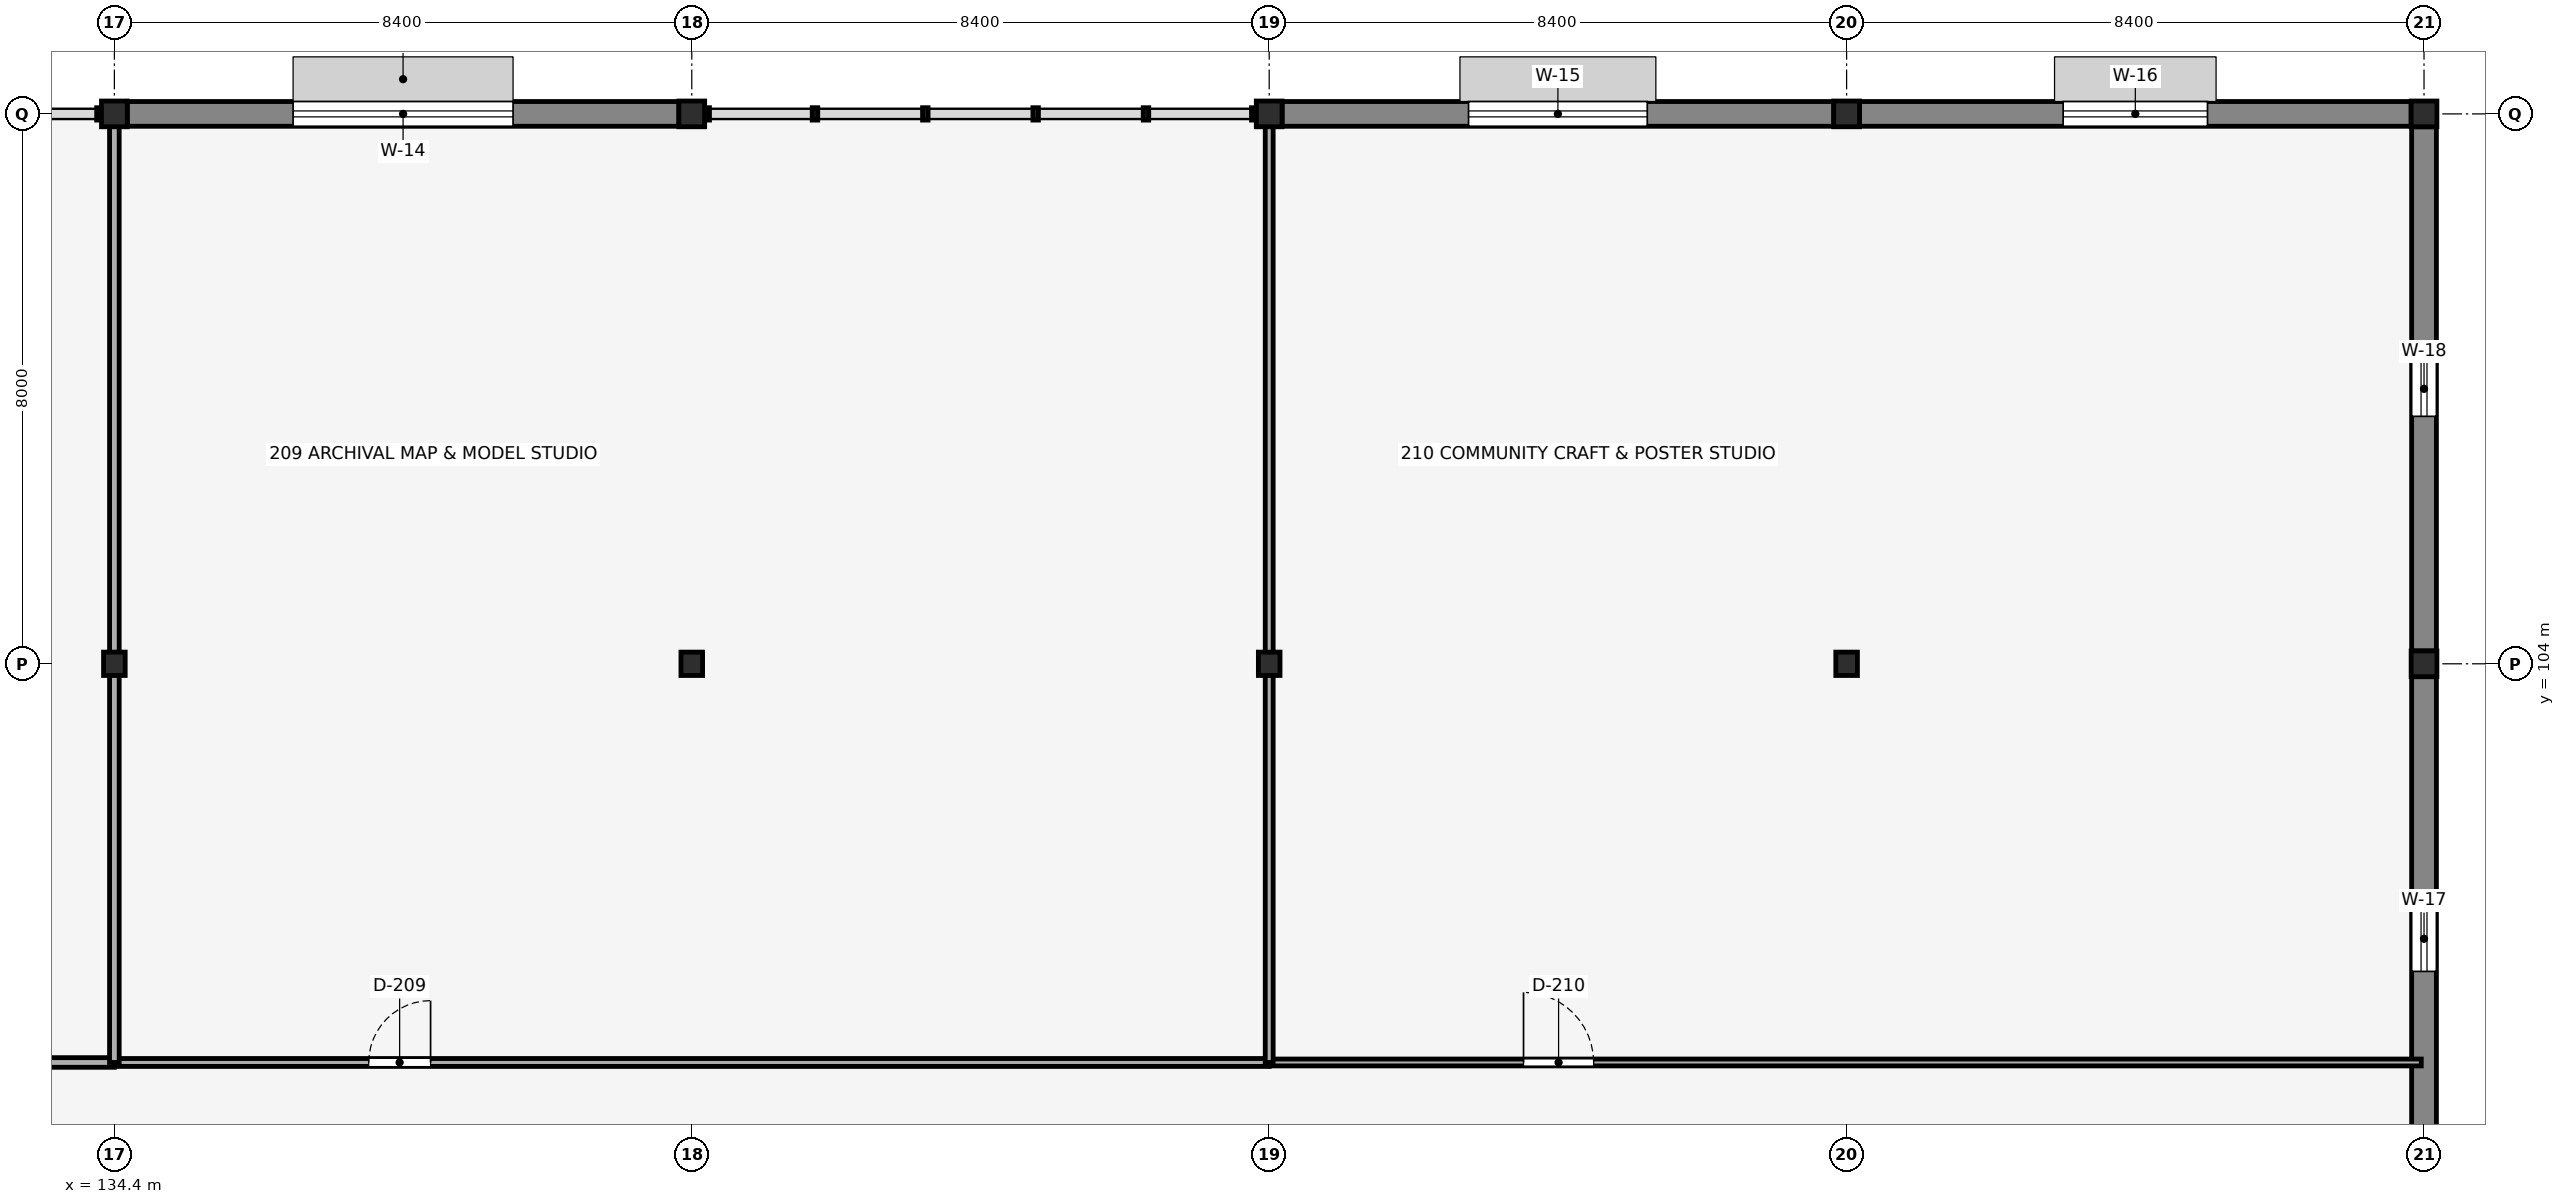
"""IFC4 building model, lengths in metres.
Left out: names, types, materials, properties, quantities, classifications, styles, units other than length and angle.
Written with IfcOpenShell. Run it as: python <this file> out.ifc"""

import sys

from ifc_helpers import new_model, si_unit, direction, frame, frame_2d, origin, origin_2d, place, context, subcontext, project, spatial, rectangle, i_section, extrude, element, fill, save


model = new_model("IFC4")
c1 = context("Model", 3, precision=1e-05, world=origin(), true_north=direction((0.0, 1.0)))
c2 = subcontext(c1, "Body", "Model", "MODEL_VIEW")
j1 = project(units=[si_unit("LENGTHUNIT", "METRE"), si_unit("PLANEANGLEUNIT", "RADIAN")], contexts=[c1])
p1 = place(None, origin())
s1 = spatial("IfcSite", under=j1, at=p1, CompositionType="ELEMENT")
p2 = place(p1, origin())
s2 = spatial("IfcBuilding", under=s1, at=p2, CompositionType="ELEMENT")
p3 = place(p2, frame((0.0, 0.0, 9.52)))
s3 = spatial("IfcBuildingStorey", under=s2, at=p3, CompositionType="ELEMENT", Elevation=9.52)
p4 = place(p3, frame((134.4, 104.0, 0.0), z_axis=(0.0, 0.0, 1.0), x_axis=(1.0, 0.0, 0.0)))
e1 = element("IfcColumn", 1, at=p4, inside=s3, PredefinedType="COLUMN", context=c2, shape_type="SweptSolid", body=[
    extrude(i_section(OverallWidth=0.314, OverallDepth=0.34, WebThickness=0.019, FlangeThickness=0.031, FilletRadius=0.015, at=origin_2d()), origin(), (0.0, 0.0, 1.0), 3.57),
])
p5 = place(p3, frame((134.4, 112.0, 0.0), z_axis=(0.0, 0.0, 1.0), x_axis=(1.0, 0.0, 0.0)))
e2 = element("IfcColumn", 2, at=p5, inside=s3, PredefinedType="COLUMN", context=c2, shape_type="SweptSolid", body=[
    extrude(i_section(OverallWidth=0.375, OverallDepth=0.375, WebThickness=0.017, FlangeThickness=0.027, FilletRadius=0.015, at=origin_2d()), origin(), (0.0, 0.0, 1.0), 3.57),
])
p6 = place(p3, frame((142.8, 104.0, 0.0), z_axis=(0.0, 0.0, 1.0), x_axis=(1.0, 0.0, 0.0)))
e3 = element("IfcColumn", 3, at=p6, inside=s3, PredefinedType="COLUMN", context=c2, shape_type="SweptSolid", body=[
    extrude(i_section(OverallWidth=0.314, OverallDepth=0.34, WebThickness=0.019, FlangeThickness=0.031, FilletRadius=0.015, at=origin_2d()), origin(), (0.0, 0.0, 1.0), 3.57),
])
p7 = place(p3, frame((142.8, 112.0, 0.0), z_axis=(0.0, 0.0, 1.0), x_axis=(1.0, 0.0, 0.0)))
e4 = element("IfcColumn", 4, at=p7, inside=s3, PredefinedType="COLUMN", context=c2, shape_type="SweptSolid", body=[
    extrude(i_section(OverallWidth=0.375, OverallDepth=0.375, WebThickness=0.017, FlangeThickness=0.027, FilletRadius=0.015, at=origin_2d()), origin(), (0.0, 0.0, 1.0), 3.57),
])
p8 = place(p3, frame((151.2, 104.0, 0.0), z_axis=(0.0, 0.0, 1.0), x_axis=(1.0, 0.0, 0.0)))
e5 = element("IfcColumn", 5, at=p8, inside=s3, PredefinedType="COLUMN", context=c2, shape_type="SweptSolid", body=[
    extrude(i_section(OverallWidth=0.314, OverallDepth=0.34, WebThickness=0.019, FlangeThickness=0.031, FilletRadius=0.015, at=origin_2d()), origin(), (0.0, 0.0, 1.0), 3.57),
])
p9 = place(p3, frame((151.2, 112.0, 0.0), z_axis=(0.0, 0.0, 1.0), x_axis=(1.0, 0.0, 0.0)))
e6 = element("IfcColumn", 6, at=p9, inside=s3, PredefinedType="COLUMN", context=c2, shape_type="SweptSolid", body=[
    extrude(i_section(OverallWidth=0.375, OverallDepth=0.375, WebThickness=0.017, FlangeThickness=0.027, FilletRadius=0.015, at=origin_2d()), origin(), (0.0, 0.0, 1.0), 3.57),
])
p10 = place(p3, frame((159.6, 104.0, 0.0), z_axis=(0.0, 0.0, 1.0), x_axis=(1.0, 0.0, 0.0)))
e7 = element("IfcColumn", 7, at=p10, inside=s3, PredefinedType="COLUMN", context=c2, shape_type="SweptSolid", body=[
    extrude(i_section(OverallWidth=0.314, OverallDepth=0.34, WebThickness=0.019, FlangeThickness=0.031, FilletRadius=0.015, at=origin_2d()), origin(), (0.0, 0.0, 1.0), 3.57),
])
for number, where, z_axis, x_axis in (
    (8, (159.6, 112.0, 0.0), (0.0, 0.0, 1.0), (1.0, 0.0, 0.0)),
    (9, (168.0, 104.0, 0.0), (0.0, 0.0, 1.0), (1.0, 0.0, 0.0)),
    (10, (168.0, 112.0, 0.0), (0.0, 0.0, 1.0), (1.0, 0.0, 0.0)),
):
    element("IfcColumn", number, at=place(p3, frame(where, z_axis=z_axis, x_axis=x_axis)), inside=s3, PredefinedType="COLUMN", context=c2, shape_type="SweptSolid", body=[
        extrude(i_section(OverallWidth=0.375, OverallDepth=0.375, WebThickness=0.017, FlangeThickness=0.027, FilletRadius=0.015, at=origin_2d()), origin(), (0.0, 0.0, 1.0), 3.57),
    ])
p11 = place(p3, frame((134.587, 112.0, 0.0), z_axis=(0.0, 0.0, 1.0), x_axis=(1.0, 0.0, 0.0)))
e11 = element("IfcWall", 11, at=p11, inside=s3, PredefinedType="SOLIDWALL", context=c2, shape_type="SweptSolid", body=[
    extrude(rectangle(XDim=8.025, YDim=0.36, at=frame_2d((4.013, 0.0))), origin(), (0.0, 0.0, 1.0), 3.27),
])
p12 = place(p11, frame((2.413, 0.0, 1.55), z_axis=(0.0, 0.0, 1.0), x_axis=(1.0, 0.0, 0.0)))
e12 = element("IfcOpeningElement", 12, at=p12, cuts=e11, PredefinedType="OPENING", context=c2, shape_type="SweptSolid", body=[
    extrude(rectangle(XDim=3.2, YDim=0.9, at=frame_2d((1.6, 0.45))), frame((0.0, 0.19, 0.0), z_axis=(0.0, -1.0, 0.0), x_axis=(1.0, 0.0, 0.0)), (0.0, 0.0, 1.0), 0.38),
])
p13 = place(p3, frame((151.387, 112.0, 0.0), z_axis=(0.0, 0.0, 1.0), x_axis=(1.0, 0.0, 0.0)))
e13 = element("IfcWall", 13, at=p13, inside=s3, PredefinedType="SOLIDWALL", context=c2, shape_type="SweptSolid", body=[
    extrude(rectangle(XDim=8.025, YDim=0.36, at=frame_2d((4.013, 0.0))), origin(), (0.0, 0.0, 1.0), 3.27),
])
p14 = place(p13, frame((2.713, 0.0, 1.55), z_axis=(0.0, 0.0, 1.0), x_axis=(1.0, 0.0, 0.0)))
e14 = element("IfcOpeningElement", 14, at=p14, cuts=e13, PredefinedType="OPENING", context=c2, shape_type="SweptSolid", body=[
    extrude(rectangle(XDim=2.6, YDim=0.85, at=frame_2d((1.3, 0.425))), frame((0.0, 0.19, 0.0), z_axis=(0.0, -1.0, 0.0), x_axis=(1.0, 0.0, 0.0)), (0.0, 0.0, 1.0), 0.38),
])
p15 = place(p3, frame((159.787, 112.0, 0.0), z_axis=(0.0, 0.0, 1.0), x_axis=(1.0, 0.0, 0.0)))
e15 = element("IfcWall", 15, at=p15, inside=s3, PredefinedType="SOLIDWALL", context=c2, shape_type="SweptSolid", body=[
    extrude(rectangle(XDim=8.025, YDim=0.36, at=frame_2d((4.013, 0.0))), origin(), (0.0, 0.0, 1.0), 3.27),
])
p16 = place(p15, frame((2.963, 0.0, 1.55), z_axis=(0.0, 0.0, 1.0), x_axis=(1.0, 0.0, 0.0)))
e16 = element("IfcOpeningElement", 16, at=p16, cuts=e15, PredefinedType="OPENING", context=c2, shape_type="SweptSolid", body=[
    extrude(rectangle(XDim=2.1, YDim=0.8, at=frame_2d((1.05, 0.4))), frame((0.0, 0.19, 0.0), z_axis=(0.0, -1.0, 0.0), x_axis=(1.0, 0.0, 0.0)), (0.0, 0.0, 1.0), 0.38),
])
p17 = place(p3, frame((168.0, 96.187, 0.0), z_axis=(0.0, 0.0, 1.0), x_axis=(0.0, 1.0, 0.0)))
e17 = element("IfcWall", 17, at=p17, inside=s3, PredefinedType="SOLIDWALL", context=c2, shape_type="SweptSolid", body=[
    extrude(rectangle(XDim=7.625, YDim=0.36, at=frame_2d((3.813, 0.0))), origin(), (0.0, 0.0, 1.0), 3.219),
])
p18 = place(p17, frame((3.338, 0.0, 0.65), z_axis=(0.0, 0.0, 1.0), x_axis=(1.0, 0.0, 0.0)))
e18 = element("IfcOpeningElement", 18, at=p18, cuts=e17, PredefinedType="OPENING", context=c2, shape_type="SweptSolid", body=[
    extrude(rectangle(XDim=0.95, YDim=2.1, at=frame_2d((0.475, 1.05))), frame((0.0, 0.19, 0.0), z_axis=(0.0, -1.0, 0.0), x_axis=(1.0, 0.0, 0.0)), (0.0, 0.0, 1.0), 0.38),
])
p19 = place(p3, frame((168.0, 104.187, 0.0), z_axis=(0.0, 0.0, 1.0), x_axis=(0.0, 1.0, 0.0)))
e19 = element("IfcWall", 19, at=p19, inside=s3, PredefinedType="SOLIDWALL", context=c2, shape_type="SweptSolid", body=[
    extrude(rectangle(XDim=7.625, YDim=0.36, at=frame_2d((3.813, 0.0))), origin(), (0.0, 0.0, 1.0), 3.219),
])
p20 = place(p19, frame((3.413, 0.0, 0.65), z_axis=(0.0, 0.0, 1.0), x_axis=(1.0, 0.0, 0.0)))
e20 = element("IfcOpeningElement", 20, at=p20, cuts=e19, PredefinedType="OPENING", context=c2, shape_type="SweptSolid", body=[
    extrude(rectangle(XDim=0.8, YDim=1.85, at=frame_2d((0.4, 0.925))), frame((0.0, 0.19, 0.0), z_axis=(0.0, -1.0, 0.0), x_axis=(1.0, 0.0, 0.0)), (0.0, 0.0, 1.0), 0.38),
])
p21 = place(p3, frame((100.84, 98.2, 0.0), z_axis=(0.0, 0.0, 1.0), x_axis=(1.0, 0.0, 0.0)))
e21 = element("IfcWall", 21, at=p21, inside=s3, PredefinedType="PARTITIONING", context=c2, shape_type="SweptSolid", body=[
    extrude(rectangle(XDim=33.56, YDim=0.14, at=frame_2d((16.78, 0.0))), origin(), (0.0, 0.0, 1.0), 3.57),
])
p22 = place(p21, frame((3.66, 0.0, 0.0), z_axis=(0.0, 0.0, 1.0), x_axis=(1.0, 0.0, 0.0)))
e22 = element("IfcOpeningElement", 22, at=p22, cuts=e21, PredefinedType="OPENING", context=c2, shape_type="SweptSolid", body=[
    extrude(rectangle(XDim=1.1, YDim=2.2, at=frame_2d((0.55, 1.1))), frame((0.0, 0.08, 0.0), z_axis=(0.0, -1.0, 0.0), x_axis=(1.0, 0.0, 0.0)), (0.0, 0.0, 1.0), 0.16),
])
p23 = place(p3, frame((134.4, 98.2, 0.0), z_axis=(0.0, 0.0, 1.0), x_axis=(1.0, 0.0, 0.0)))
e23 = element("IfcWall", 23, at=p23, inside=s3, PredefinedType="PARTITIONING", context=c2, shape_type="SweptSolid", body=[
    extrude(rectangle(XDim=16.8, YDim=0.115, at=frame_2d((8.4, 0.0))), origin(), (0.0, 0.0, 1.0), 3.107),
])
p24 = place(p23, frame((3.7, 0.0, 0.0), z_axis=(0.0, 0.0, 1.0), x_axis=(1.0, 0.0, 0.0)))
e24 = element("IfcOpeningElement", 24, at=p24, cuts=e23, PredefinedType="OPENING", context=c2, shape_type="SweptSolid", body=[
    extrude(rectangle(XDim=0.9, YDim=2.1, at=frame_2d((0.45, 1.05))), frame((0.0, 0.067, 0.0), z_axis=(0.0, -1.0, 0.0), x_axis=(1.0, 0.0, 0.0)), (0.0, 0.0, 1.0), 0.135),
])
p25 = place(p3, frame((151.2, 98.2, 0.0), z_axis=(0.0, 0.0, 1.0), x_axis=(1.0, 0.0, 0.0)))
e25 = element("IfcWall", 25, at=p25, inside=s3, PredefinedType="PARTITIONING", context=c2, shape_type="SweptSolid", body=[
    extrude(rectangle(XDim=16.76, YDim=0.1, at=frame_2d((8.38, 0.0))), origin(), (0.0, 0.0, 1.0), 3.107),
])
p26 = place(p25, frame((3.7, 0.0, 0.0), z_axis=(0.0, 0.0, 1.0), x_axis=(1.0, 0.0, 0.0)))
e26 = element("IfcOpeningElement", 26, at=p26, cuts=e25, PredefinedType="OPENING", context=c2, shape_type="SweptSolid", body=[
    extrude(rectangle(XDim=1.02, YDim=2.16, at=frame_2d((0.51, 1.08))), frame((0.0, 0.06, 0.0), z_axis=(0.0, -1.0, 0.0), x_axis=(1.0, 0.0, 0.0)), (0.0, 0.0, 1.0), 0.12),
])
p27 = place(p3, frame((134.4, 98.2, 0.0), z_axis=(0.0, 0.0, 1.0), x_axis=(0.0, 1.0, 0.0)))
e27 = element("IfcWall", 27, at=p27, inside=s3, PredefinedType="PARTITIONING", context=c2, shape_type="SweptSolid", body=[
    extrude(rectangle(XDim=5.64, YDim=0.14, at=frame_2d((2.82, 0.0))), origin(), (0.0, 0.0, 1.0), 3.107),
])
p28 = place(p3, frame((134.4, 104.16, 0.0), z_axis=(0.0, 0.0, 1.0), x_axis=(0.0, 1.0, 0.0)))
e28 = element("IfcWall", 28, at=p28, inside=s3, PredefinedType="PARTITIONING", context=c2, shape_type="SweptSolid", body=[
    extrude(rectangle(XDim=7.663, YDim=0.14, at=frame_2d((3.832, 0.0))), origin(), (0.0, 0.0, 1.0), 3.107),
])
p29 = place(p3, frame((151.2, 98.2, 0.0), z_axis=(0.0, 0.0, 1.0), x_axis=(0.0, 1.0, 0.0)))
e29 = element("IfcWall", 29, at=p29, inside=s3, PredefinedType="PARTITIONING", context=c2, shape_type="SweptSolid", body=[
    extrude(rectangle(XDim=5.64, YDim=0.115, at=frame_2d((2.82, 0.0))), origin(), (0.0, 0.0, 1.0), 3.107),
])
p30 = place(p3, frame((151.2, 104.16, 0.0), z_axis=(0.0, 0.0, 1.0), x_axis=(0.0, 1.0, 0.0)))
e30 = element("IfcWall", 30, at=p30, inside=s3, PredefinedType="PARTITIONING", context=c2, shape_type="SweptSolid", body=[
    extrude(rectangle(XDim=7.663, YDim=0.115, at=frame_2d((3.832, 0.0))), origin(), (0.0, 0.0, 1.0), 3.107),
])
p31 = place(p12, origin())
e31 = element("IfcWindow", 31, at=p31, inside=s3, PartitioningType="TRIPLE_PANEL_HORIZONTAL", PredefinedType="WINDOW", context=c2, shape_type="SweptSolid", body=[
    extrude(rectangle(XDim=3.2, YDim=0.9, at=frame_2d((1.6, 0.45))), frame((0.0, 0.03, 0.0), z_axis=(0.0, -1.0, 0.0), x_axis=(1.0, 0.0, 0.0)), (0.0, 0.0, 1.0), 0.06),
])
fill(e12, e31)
p32 = place(p14, origin())
e32 = element("IfcWindow", 32, at=p32, inside=s3, PartitioningType="DOUBLE_PANEL_HORIZONTAL", PredefinedType="WINDOW", context=c2, shape_type="SweptSolid", body=[
    extrude(rectangle(XDim=2.6, YDim=0.85, at=frame_2d((1.3, 0.425))), frame((0.0, 0.03, 0.0), z_axis=(0.0, -1.0, 0.0), x_axis=(1.0, 0.0, 0.0)), (0.0, 0.0, 1.0), 0.06),
])
fill(e14, e32)
p33 = place(p16, origin())
e33 = element("IfcWindow", 33, at=p33, inside=s3, PartitioningType="DOUBLE_PANEL_HORIZONTAL", PredefinedType="WINDOW", context=c2, shape_type="SweptSolid", body=[
    extrude(rectangle(XDim=2.1, YDim=0.8, at=frame_2d((1.05, 0.4))), frame((0.0, 0.03, 0.0), z_axis=(0.0, -1.0, 0.0), x_axis=(1.0, 0.0, 0.0)), (0.0, 0.0, 1.0), 0.06),
])
fill(e16, e33)
p34 = place(p18, origin())
e34 = element("IfcWindow", 34, at=p34, inside=s3, PartitioningType="SINGLE_PANEL", PredefinedType="WINDOW", context=c2, shape_type="SweptSolid", body=[
    extrude(rectangle(XDim=0.95, YDim=2.1, at=frame_2d((0.475, 1.05))), frame((0.0, 0.03, 0.0), z_axis=(0.0, -1.0, 0.0), x_axis=(1.0, 0.0, 0.0)), (0.0, 0.0, 1.0), 0.06),
])
fill(e18, e34)
p35 = place(p20, origin())
e35 = element("IfcWindow", 35, at=p35, inside=s3, PartitioningType="SINGLE_PANEL", PredefinedType="WINDOW", context=c2, shape_type="SweptSolid", body=[
    extrude(rectangle(XDim=0.8, YDim=1.85, at=frame_2d((0.4, 0.925))), frame((0.0, 0.03, 0.0), z_axis=(0.0, -1.0, 0.0), x_axis=(1.0, 0.0, 0.0)), (0.0, 0.0, 1.0), 0.06),
])
fill(e20, e35)
p36 = place(p24, origin())
e36 = element("IfcDoor", 36, at=p36, inside=s3, OperationType="SINGLE_SWING_RIGHT", PredefinedType="DOOR", context=c2, shape_type="SweptSolid", body=[
    extrude(rectangle(XDim=0.9, YDim=2.1, at=frame_2d((0.45, 1.05))), frame((0.0, 0.025, 0.0), z_axis=(0.0, -1.0, 0.0), x_axis=(1.0, 0.0, 0.0)), (0.0, 0.0, 1.0), 0.05),
])
fill(e24, e36)
p37 = place(p26, origin())
e37 = element("IfcDoor", 37, at=p37, inside=s3, OperationType="SINGLE_SWING_LEFT", PredefinedType="DOOR", context=c2, shape_type="SweptSolid", body=[
    extrude(rectangle(XDim=1.02, YDim=2.16, at=frame_2d((0.51, 1.08))), frame((0.0, 0.025, 0.0), z_axis=(0.0, -1.0, 0.0), x_axis=(1.0, 0.0, 0.0)), (0.0, 0.0, 1.0), 0.05),
])
fill(e26, e37)
save(model, sys.argv[1])
